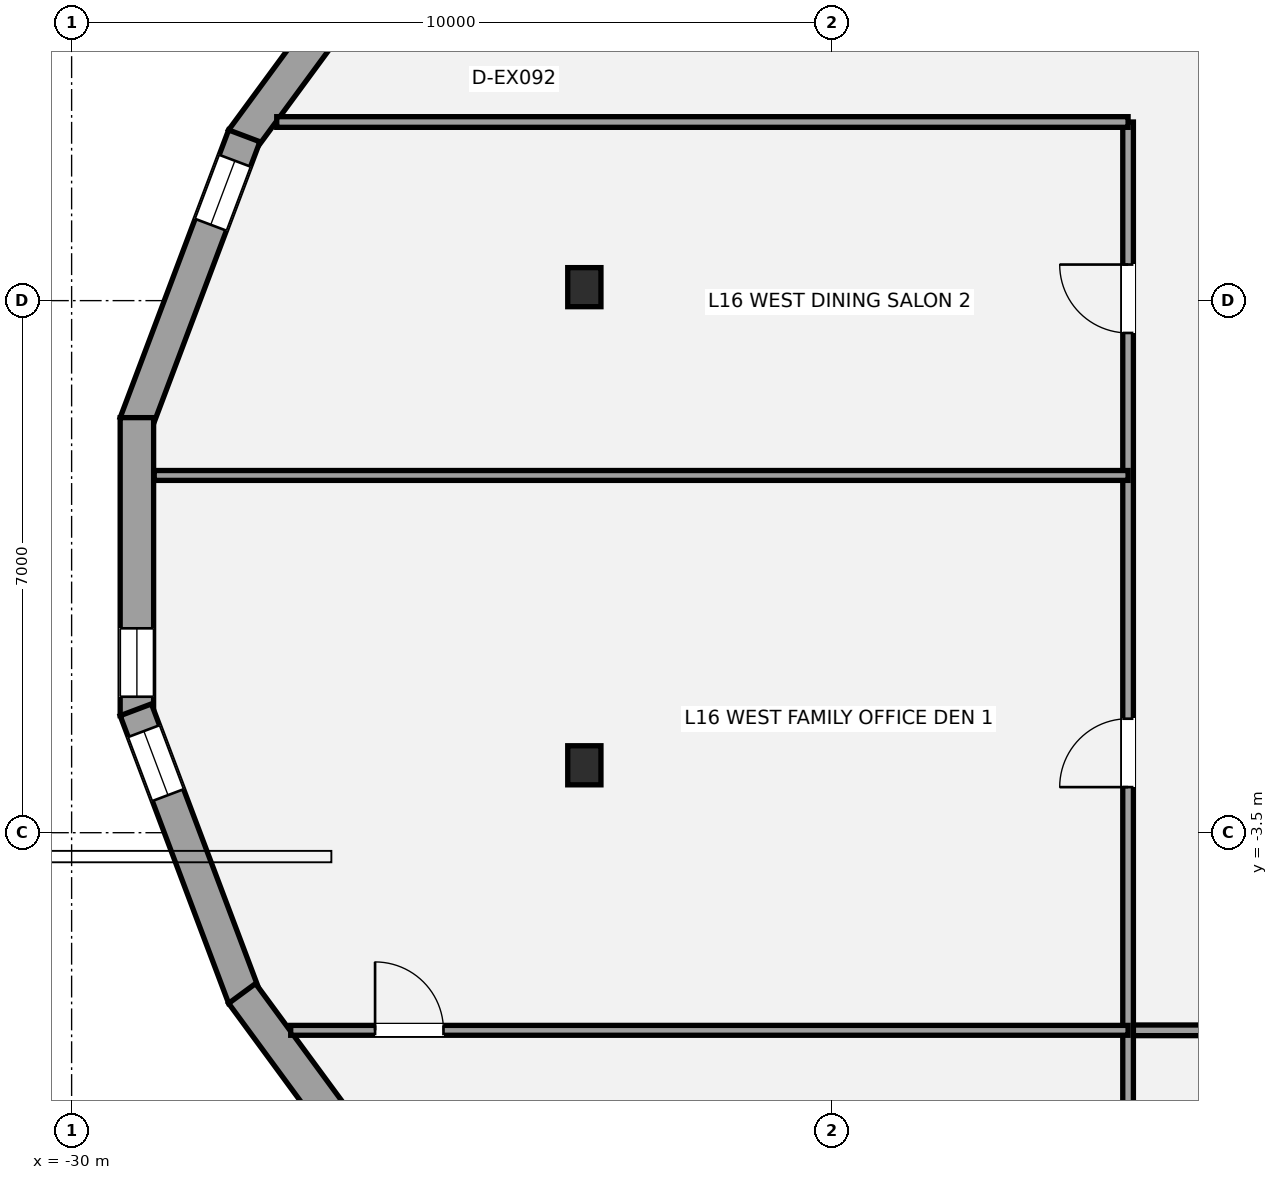
"""IFC4 building model, lengths in metres.
Left out: names, types, materials, properties, quantities, classifications, styles, units other than length and angle.
Written with IfcOpenShell. Run it as: python <this file> out.ifc"""

import sys

from ifc_helpers import new_model, si_unit, direction, frame, frame_2d, origin, origin_2d, place, context, subcontext, project, spatial, rectangle, i_section, extrude, element, fill, save


model = new_model("IFC4")
c1 = context("Model", 3, precision=1e-05, world=origin(), true_north=direction((0.0, 1.0)))
c2 = subcontext(c1, "Body", "Model", "MODEL_VIEW")
j1 = project(units=[si_unit("LENGTHUNIT", "METRE"), si_unit("PLANEANGLEUNIT", "RADIAN")], contexts=[c1])
p1 = place(None, origin())
s1 = spatial("IfcSite", under=j1, at=p1, CompositionType="ELEMENT")
p2 = place(p1, origin())
s2 = spatial("IfcBuilding", under=s1, at=p2, CompositionType="ELEMENT")
p3 = place(p2, frame((0.0, 0.0, 63.0)))
s3 = spatial("IfcBuildingStorey", under=s2, at=p3, CompositionType="ELEMENT", Elevation=63.0)
for number, where, z_axis, x_axis in (
    (1, (-23.254, 3.677, 0.0), (0.0, 0.0, 1.0), (1.0, 0.0, 0.0)),
    (2, (-23.254, -2.613, 0.0), (0.0, 0.0, 1.0), (1.0, 0.0, 0.0)),
):
    element("IfcColumn", number, at=place(p3, frame(where, z_axis=z_axis, x_axis=x_axis)), inside=s3, PredefinedType="COLUMN", context=c2, shape_type="SweptSolid", body=[
        extrude(i_section(OverallWidth=0.437, OverallDepth=0.514, WebThickness=0.061, FlangeThickness=0.097, at=origin_2d()), origin(), (0.0, 0.0, 1.0), 3.6),
    ])
p4 = place(p3, frame((-27.757, 5.615, 0.0), z_axis=(0.0, 0.0, 1.0), x_axis=(0.592261182237, 0.80574604685, 0.0)))
e3 = element("IfcWall", 3, at=p4, inside=s3, PredefinedType="STANDARD", context=c2, shape_type="SweptSolid", body=[
    extrude(rectangle(XDim=4.291, YDim=0.44, at=frame_2d((2.146, 0.0))), origin(), (0.0, 0.0, 1.0), 2.529),
])
p5 = place(p4, frame((3.141, 0.0, 0.58)))
e4 = element("IfcOpeningElement", 4, at=p5, cuts=e3, PredefinedType="OPENING", context=c2, shape_type="SweptSolid", body=[
    extrude(rectangle(XDim=0.9, YDim=1.35, at=frame_2d((0.45, 0.675))), frame((0.0, 0.23, 0.0), z_axis=(0.0, -1.0, 0.0), x_axis=(1.0, 0.0, 0.0)), (0.0, 0.0, 1.0), 0.46),
])
p6 = place(p3, frame((-29.155, 1.883, 0.0), z_axis=(0.0, 0.0, 1.0), x_axis=(0.352750180024, 0.935717537771, 0.0)))
e5 = element("IfcWall", 5, at=p6, inside=s3, PredefinedType="STANDARD", context=c2, shape_type="SweptSolid", body=[
    extrude(rectangle(XDim=4.045, YDim=0.44, at=frame_2d((2.022, 0.0))), origin(), (0.0, 0.0, 1.0), 2.529),
])
p7 = place(p6, frame((2.795, 0.0, 0.58)))
e6 = element("IfcOpeningElement", 6, at=p7, cuts=e5, PredefinedType="OPENING", context=c2, shape_type="SweptSolid", body=[
    extrude(rectangle(XDim=0.9, YDim=1.35, at=frame_2d((0.45, 0.675))), frame((0.0, 0.23, 0.0), z_axis=(0.0, -1.0, 0.0), x_axis=(1.0, 0.0, 0.0)), (0.0, 0.0, 1.0), 0.46),
])
p8 = place(p3, frame((-29.141, -1.961, 0.0), z_axis=(0.0, 0.0, 1.0), x_axis=(0.0, 1.0, 0.0)))
e7 = element("IfcWall", 7, at=p8, inside=s3, PredefinedType="STANDARD", context=c2, shape_type="SweptSolid", body=[
    extrude(rectangle(XDim=3.921, YDim=0.44, at=frame_2d((1.961, 0.0))), origin(), (0.0, 0.0, 1.0), 2.533),
])
p9 = place(p8, frame((0.25, 0.0, 0.58)))
e8 = element("IfcOpeningElement", 8, at=p9, cuts=e7, PredefinedType="OPENING", context=c2, shape_type="SweptSolid", body=[
    extrude(rectangle(XDim=0.9, YDim=1.35, at=frame_2d((0.45, 0.675))), frame((0.0, 0.23, 0.0), z_axis=(0.0, -1.0, 0.0), x_axis=(1.0, 0.0, 0.0)), (0.0, 0.0, 1.0), 0.46),
])
p10 = place(p3, frame((-27.729, -5.668, 0.0), z_axis=(0.0, 0.0, 1.0), x_axis=(-0.352750180024, 0.935717537771, 0.0)))
e9 = element("IfcWall", 9, at=p10, inside=s3, PredefinedType="STANDARD", context=c2, shape_type="SweptSolid", body=[
    extrude(rectangle(XDim=4.045, YDim=0.44, at=frame_2d((2.022, 0.0))), origin(), (0.0, 0.0, 1.0), 2.529),
])
p11 = place(p10, frame((2.845, 0.0, 0.58)))
e10 = element("IfcOpeningElement", 10, at=p11, cuts=e9, PredefinedType="OPENING", context=c2, shape_type="SweptSolid", body=[
    extrude(rectangle(XDim=0.9, YDim=1.35, at=frame_2d((0.45, 0.675))), frame((0.0, 0.23, 0.0), z_axis=(0.0, -1.0, 0.0), x_axis=(1.0, 0.0, 0.0)), (0.0, 0.0, 1.0), 0.46),
])
p12 = place(p3, frame((-25.216, -9.072, 0.0), z_axis=(0.0, 0.0, 1.0), x_axis=(-0.592261182237, 0.80574604685, 0.0)))
e11 = element("IfcWall", 11, at=p12, inside=s3, PredefinedType="STANDARD", context=c2, shape_type="SweptSolid", body=[
    extrude(rectangle(XDim=4.291, YDim=0.44, at=frame_2d((2.146, 0.0))), origin(), (0.0, 0.0, 1.0), 2.529),
])
p13 = place(p12, frame((0.449, 0.0, 0.58)))
e12 = element("IfcOpeningElement", 12, at=p13, cuts=e11, PredefinedType="OPENING", context=c2, shape_type="SweptSolid", body=[
    extrude(rectangle(XDim=0.9, YDim=1.35, at=frame_2d((0.45, 0.675))), frame((0.0, 0.23, 0.0), z_axis=(0.0, -1.0, 0.0), x_axis=(1.0, 0.0, 0.0)), (0.0, 0.0, 1.0), 0.46),
])
p14 = place(p3, frame((-16.1, -6.1, 0.0), z_axis=(0.0, 0.0, 1.0), x_axis=(1.0, 0.0, 0.0)))
e13 = element("IfcWall", 13, at=p14, inside=s3, PredefinedType="PARTITIONING", context=c2, shape_type="SweptSolid", body=[
    extrude(rectangle(XDim=34.7, YDim=0.14, at=frame_2d((17.35, 0.0))), origin(), (0.0, 0.0, 1.0), 3.4),
])
p15 = place(p14, frame((8.1, 0.0, 0.0)))
e14 = element("IfcOpeningElement", 14, at=p15, cuts=e13, PredefinedType="OPENING", context=c2, shape_type="SweptSolid", body=[
    extrude(rectangle(XDim=0.9, YDim=2.1, at=frame_2d((0.45, 1.05))), frame((0.0, 0.08, 0.0), z_axis=(0.0, -1.0, 0.0), x_axis=(1.0, 0.0, 0.0)), (0.0, 0.0, 1.0), 0.16),
])
p16 = place(p14, frame((25.45, 0.0, 0.0)))
e15 = element("IfcOpeningElement", 15, at=p16, cuts=e13, PredefinedType="OPENING", context=c2, shape_type="SweptSolid", body=[
    extrude(rectangle(XDim=0.9, YDim=2.1, at=frame_2d((0.45, 1.05))), frame((0.0, 0.08, 0.0), z_axis=(0.0, -1.0, 0.0), x_axis=(1.0, 0.0, 0.0)), (0.0, 0.0, 1.0), 0.16),
])
p17 = place(p3, frame((-16.1, -15.427, 0.0), z_axis=(0.0, 0.0, 1.0), x_axis=(0.0, 1.0, 0.0)))
e16 = element("IfcWall", 16, at=p17, inside=s3, PredefinedType="PARTITIONING", context=c2, shape_type="SweptSolid", body=[
    extrude(rectangle(XDim=21.277, YDim=0.14, at=frame_2d((10.639, 0.0))), origin(), (0.0, 0.0, 1.0), 2.841),
])
p18 = place(p17, frame((12.527, 0.0, 0.0)))
e17 = element("IfcOpeningElement", 17, at=p18, cuts=e16, PredefinedType="OPENING", context=c2, shape_type="SweptSolid", body=[
    extrude(rectangle(XDim=0.9, YDim=2.1, at=frame_2d((0.45, 1.05))), frame((0.0, 0.08, 0.0), z_axis=(0.0, -1.0, 0.0), x_axis=(1.0, 0.0, 0.0)), (0.0, 0.0, 1.0), 0.16),
])
p19 = place(p17, frame((18.501, 0.0, 0.0)))
e18 = element("IfcOpeningElement", 18, at=p19, cuts=e16, PredefinedType="OPENING", context=c2, shape_type="SweptSolid", body=[
    extrude(rectangle(XDim=0.9, YDim=2.1, at=frame_2d((0.45, 1.05))), frame((0.0, 0.08, 0.0), z_axis=(0.0, -1.0, 0.0), x_axis=(1.0, 0.0, 0.0)), (0.0, 0.0, 1.0), 0.16),
])
p20 = place(p3, frame((-27.301, 5.85, 0.0), z_axis=(0.0, 0.0, 1.0), x_axis=(1.0, 0.0, 0.0)))
e19 = element("IfcWall", 19, at=p20, inside=s3, PredefinedType="PARTITIONING", context=c2, shape_type="SweptSolid", body=[
    extrude(rectangle(XDim=11.201, YDim=0.14, at=frame_2d((5.601, 0.0))), origin(), (0.0, 0.0, 1.0), 2.853),
])
p21 = place(p3, frame((-27.117, -6.1, 0.0), z_axis=(0.0, 0.0, 1.0), x_axis=(1.0, 0.0, 0.0)))
e20 = element("IfcWall", 20, at=p21, inside=s3, PredefinedType="PARTITIONING", context=c2, shape_type="SweptSolid", body=[
    extrude(rectangle(XDim=11.017, YDim=0.13, at=frame_2d((5.509, 0.0))), origin(), (0.0, 0.0, 1.0), 2.779),
])
p22 = place(p21, frame((1.11, 0.0, 0.0)))
e21 = element("IfcOpeningElement", 21, at=p22, cuts=e20, PredefinedType="OPENING", context=c2, shape_type="SweptSolid", body=[
    extrude(rectangle(XDim=0.9, YDim=2.1, at=frame_2d((0.45, 1.05))), frame((0.0, 0.075, 0.0), z_axis=(0.0, -1.0, 0.0), x_axis=(1.0, 0.0, 0.0)), (0.0, 0.0, 1.0), 0.15),
])
p23 = place(p3, frame((-28.913, 1.2, 0.0), z_axis=(0.0, 0.0, 1.0), x_axis=(1.0, 0.0, 0.0)))
e22 = element("IfcWall", 22, at=p23, inside=s3, PredefinedType="PARTITIONING", context=c2, shape_type="SweptSolid", body=[
    extrude(rectangle(XDim=12.813, YDim=0.13, at=frame_2d((6.406, 0.0))), origin(), (0.0, 0.0, 1.0), 2.853),
])
p24 = place(p7, origin())
e23 = element("IfcWindow", 23, at=p24, inside=s3, PartitioningType="SINGLE_PANEL", PredefinedType="WINDOW", context=c2, shape_type="SweptSolid", body=[
    extrude(rectangle(XDim=0.9, YDim=1.35, at=frame_2d((0.45, 0.675))), frame((0.0, -0.01, 0.0), z_axis=(0.0, -1.0, 0.0), x_axis=(1.0, 0.0, 0.0)), (0.0, 0.0, 1.0), 0.06),
])
fill(e6, e23)
p25 = place(p9, origin())
e24 = element("IfcWindow", 24, at=p25, inside=s3, PartitioningType="SINGLE_PANEL", PredefinedType="WINDOW", context=c2, shape_type="SweptSolid", body=[
    extrude(rectangle(XDim=0.9, YDim=1.35, at=frame_2d((0.45, 0.675))), frame((0.0, -0.01, 0.0), z_axis=(0.0, -1.0, 0.0), x_axis=(1.0, 0.0, 0.0)), (0.0, 0.0, 1.0), 0.06),
])
fill(e8, e24)
p26 = place(p11, origin())
e25 = element("IfcWindow", 25, at=p26, inside=s3, PartitioningType="SINGLE_PANEL", PredefinedType="WINDOW", context=c2, shape_type="SweptSolid", body=[
    extrude(rectangle(XDim=0.9, YDim=1.35, at=frame_2d((0.45, 0.675))), frame((0.0, -0.01, 0.0), z_axis=(0.0, -1.0, 0.0), x_axis=(1.0, 0.0, 0.0)), (0.0, 0.0, 1.0), 0.06),
])
fill(e10, e25)
p27 = place(p22, origin())
e26 = element("IfcDoor", 26, at=p27, inside=s3, OperationType="SINGLE_SWING_LEFT", PredefinedType="DOOR", context=c2, shape_type="SweptSolid", body=[
    extrude(rectangle(XDim=0.9, YDim=2.1, at=frame_2d((0.45, 1.05))), frame((0.0, 0.025, 0.0), z_axis=(0.0, -1.0, 0.0), x_axis=(1.0, 0.0, 0.0)), (0.0, 0.0, 1.0), 0.05),
])
fill(e21, e26)
p28 = place(p18, origin())
e27 = element("IfcDoor", 27, at=p28, inside=s3, OperationType="SINGLE_SWING_LEFT", PredefinedType="DOOR", context=c2, shape_type="SweptSolid", body=[
    extrude(rectangle(XDim=0.9, YDim=2.1, at=frame_2d((0.45, 1.05))), frame((0.0, 0.025, 0.0), z_axis=(0.0, -1.0, 0.0), x_axis=(1.0, 0.0, 0.0)), (0.0, 0.0, 1.0), 0.05),
])
fill(e17, e27)
p29 = place(p19, origin())
e28 = element("IfcDoor", 28, at=p29, inside=s3, OperationType="SINGLE_SWING_RIGHT", PredefinedType="DOOR", context=c2, shape_type="SweptSolid", body=[
    extrude(rectangle(XDim=0.9, YDim=2.1, at=frame_2d((0.45, 1.05))), frame((0.0, 0.025, 0.0), z_axis=(0.0, -1.0, 0.0), x_axis=(1.0, 0.0, 0.0)), (0.0, 0.0, 1.0), 0.05),
])
fill(e18, e28)
save(model, sys.argv[1])
